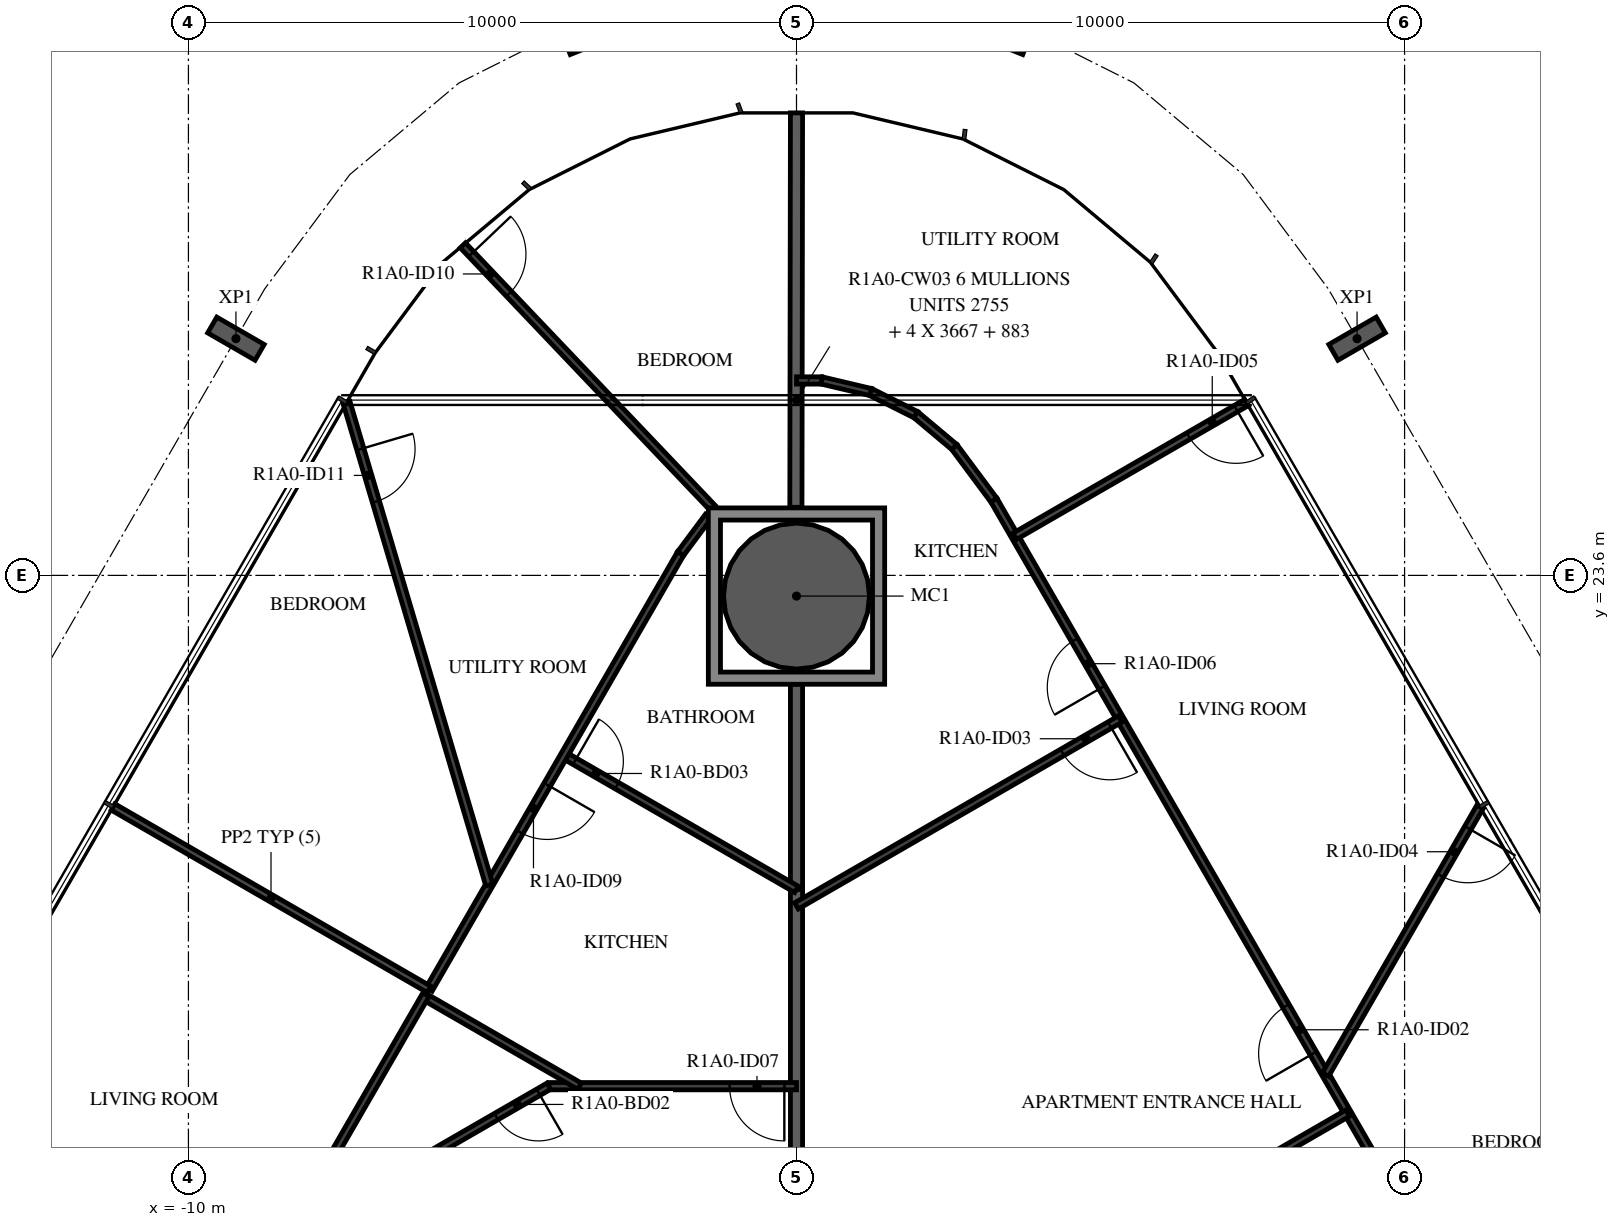
"""IFC4 building model, lengths in metres.
Left out: names, types, materials, properties, quantities, classifications, styles, units other than length and angle.
Written with IfcOpenShell. Run it as: python <this file> out.ifc"""

import sys

from ifc_helpers import new_model, si_unit, direction, frame, frame_2d, origin, origin_2d, place, context, subcontext, project, spatial, polyline, rectangle, hollow_circle, i_section, outline, extrude, element, fill, save


model = new_model("IFC4")
c1 = context("Model", 3, precision=1e-05, world=origin(), true_north=direction((0.0, 1.0)))
c2 = subcontext(c1, "Body", "Model", "MODEL_VIEW")
j1 = project(units=[si_unit("LENGTHUNIT", "METRE"), si_unit("PLANEANGLEUNIT", "RADIAN")], contexts=[c1])
p1 = place(None, origin())
s1 = spatial("IfcSite", under=j1, at=p1, CompositionType="ELEMENT")
p2 = place(p1, origin())
s2 = spatial("IfcBuilding", under=s1, at=p2, CompositionType="ELEMENT")
p3 = place(p2, frame((0.0, 0.0, 38.4)))
s3 = spatial("IfcBuildingStorey", under=s2, at=p3, CompositionType="ELEMENT", Elevation=38.4)
p4 = place(p3, frame((0.0, 23.26, -0.45), z_axis=(0.0, 0.0, 1.0), x_axis=(1.0, 0.0, 0.0)))
e1 = element("IfcColumn", 1, at=p4, inside=s3, PredefinedType="COLUMN", context=c2, shape_type="SweptSolid", body=[
    extrude(hollow_circle(Radius=1.2, WallThickness=0.06, at=origin_2d()), origin(), (0.0, 0.0, 1.0), 3.57),
])
for number, where, z_axis, x_axis in (
    (2, (9.219, 27.493, -0.45), (0.0, 0.0, 1.0), (0.5, -0.866, 0.0)),
    (3, (3.748, 32.639, -0.45), (0.0, 0.0, 1.0), (0.929, -0.371, 0.0)),
    (4, (-3.748, 32.639, -0.45), (0.0, 0.0, 1.0), (0.929, 0.371, 0.0)),
    (5, (-9.219, 27.493, -0.45), (0.0, 0.0, 1.0), (0.5, 0.866, 0.0)),
):
    element("IfcColumn", number, at=place(p3, frame(where, z_axis=z_axis, x_axis=x_axis)), inside=s3, PredefinedType="COLUMN", context=c2, shape_type="SweptSolid", body=[
        extrude(i_section(OverallWidth=0.3, OverallDepth=0.9, WebThickness=0.019, FlangeThickness=0.035, FilletRadius=0.03, at=origin_2d()), origin(), (0.0, 0.0, 1.0), 3.57),
    ])
p5 = place(p3, frame((0.0, 18.437, 0.0), z_axis=(0.0, 0.0, 1.0), x_axis=(0.0, -1.0, 0.0)))
e6 = element("IfcWall", 6, at=p5, inside=s3, PredefinedType="STANDARD", context=c2, shape_type="SweptSolid", body=[
    extrude(rectangle(XDim=4.737, YDim=0.2, at=frame_2d((2.368, 0.0))), origin(), (0.0, 0.0, 1.0), 3.12),
])
p6 = place(p3, frame((0.0, 31.206, 0.0), z_axis=(0.0, 0.0, 1.0), x_axis=(-0.001543266126, -0.999998809164, 0.0)))
e7 = element("IfcWall", 7, at=p6, inside=s3, PredefinedType="STANDARD", context=c2, shape_type="SweptSolid", body=[
    extrude(rectangle(XDim=6.486, YDim=0.2, at=frame_2d((3.243, 0.0))), origin(), (0.0, 0.0, 1.0), 3.12),
])
p7 = place(p3, frame((0.0, 21.81, 0.0), z_axis=(0.0, 0.0, 1.0), x_axis=(0.0, -1.0, 0.0)))
e8 = element("IfcWall", 8, at=p7, inside=s3, PredefinedType="STANDARD", context=c2, shape_type="SweptSolid", body=[
    extrude(rectangle(XDim=3.373, YDim=0.2, at=frame_2d((1.687, 0.0))), origin(), (0.0, 0.0, 1.0), 3.12),
])
p8 = place(p3, frame((11.139, 11.167, 0.0), z_axis=(0.0, 0.0, 1.0), x_axis=(-0.499994660107, 0.866028486751, 0.0)))
e9 = element("IfcWall", 9, at=p8, inside=s3, PredefinedType="PARTITIONING", context=c2, shape_type="SweptSolid", body=[
    extrude(rectangle(XDim=15.786, YDim=0.12, at=frame_2d((7.893, 0.0))), origin(), (0.0, 0.0, 1.0), 3.12),
])
p9 = place(p8, frame((5.279, 0.0, 0.0)))
e10 = element("IfcOpeningElement", 10, at=p9, cuts=e9, PredefinedType="OPENING", context=c2, shape_type="SweptSolid", body=[
    extrude(rectangle(XDim=0.9, YDim=2.1, at=frame_2d((0.45, 1.05))), frame((0.0, 0.07, 0.0), z_axis=(0.0, -1.0, 0.0), x_axis=(1.0, 0.0, 0.0)), (0.0, 0.0, 1.0), 0.14),
])
p10 = place(p8, frame((12.23, 0.0, 0.0)))
e11 = element("IfcOpeningElement", 11, at=p10, cuts=e9, PredefinedType="OPENING", context=c2, shape_type="SweptSolid", body=[
    extrude(rectangle(XDim=0.9, YDim=2.1, at=frame_2d((0.45, 1.05))), frame((0.0, 0.07, 0.0), z_axis=(0.0, -1.0, 0.0), x_axis=(1.0, 0.0, 0.0)), (0.0, 0.0, 1.0), 0.14),
])
p11 = place(p3, frame((6.952, 13.538, 0.0), z_axis=(0.0, 0.0, 1.0), x_axis=(0.866030657337, 0.49999090047, 0.0)))
e12 = element("IfcWall", 12, at=p11, inside=s3, PredefinedType="PARTITIONING", context=c2, shape_type="SweptSolid", body=[
    extrude(rectangle(XDim=2.44, YDim=0.12, at=frame_2d((1.22, 0.0))), origin(), (0.0, 0.0, 1.0), 3.12),
])
p12 = place(p3, frame((5.324, 21.239, 0.0), z_axis=(0.0, 0.0, 1.0), x_axis=(-0.866030172657, -0.49999173998, 0.0)))
e13 = element("IfcWall", 13, at=p12, inside=s3, PredefinedType="PARTITIONING", context=c2, shape_type="SweptSolid", body=[
    extrude(rectangle(XDim=6.147, YDim=0.12, at=frame_2d((3.074, 0.0))), origin(), (0.0, 0.0, 1.0), 3.12),
])
p13 = place(p12, frame((0.2, 0.0, 0.0)))
e14 = element("IfcOpeningElement", 14, at=p13, cuts=e13, PredefinedType="OPENING", context=c2, shape_type="SweptSolid", body=[
    extrude(rectangle(XDim=0.9, YDim=2.1, at=frame_2d((0.45, 1.05))), frame((0.0, 0.07, 0.0), z_axis=(0.0, -1.0, 0.0), x_axis=(1.0, 0.0, 0.0)), (0.0, 0.0, 1.0), 0.14),
])
p14 = place(p3, frame((11.24, 19.792, 0.0), z_axis=(0.0, 0.0, 1.0), x_axis=(-0.499978956711, -0.866037552792, 0.0)))
e15 = element("IfcWall", 15, at=p14, inside=s3, PredefinedType="PARTITIONING", context=c2, shape_type="SweptSolid", body=[
    extrude(rectangle(XDim=5.081, YDim=0.12, at=frame_2d((2.541, 0.0))), origin(), (0.0, 0.0, 1.0), 3.12),
])
p15 = place(p14, frame((0.4, 0.0, 0.0)))
e16 = element("IfcOpeningElement", 16, at=p15, cuts=e15, PredefinedType="OPENING", context=c2, shape_type="SweptSolid", body=[
    extrude(rectangle(XDim=0.9, YDim=2.1, at=frame_2d((0.45, 1.05))), frame((0.0, 0.07, 0.0), z_axis=(0.0, -1.0, 0.0), x_axis=(1.0, 0.0, 0.0)), (0.0, 0.0, 1.0), 0.14),
])
p16 = place(p3, frame((7.4, 26.443, 0.0), z_axis=(0.0, 0.0, 1.0), x_axis=(-0.866032203192, -0.499988222896, 0.0)))
e17 = element("IfcWall", 17, at=p16, inside=s3, PredefinedType="PARTITIONING", context=c2, shape_type="SweptSolid", body=[
    extrude(rectangle(XDim=4.4, YDim=0.12, at=frame_2d((2.2, 0.0))), origin(), (0.0, 0.0, 1.0), 2.73),
])
p17 = place(p16, frame((0.2, 0.0, 0.0)))
e18 = element("IfcOpeningElement", 18, at=p17, cuts=e17, PredefinedType="OPENING", context=c2, shape_type="SweptSolid", body=[
    extrude(rectangle(XDim=0.9, YDim=2.1, at=frame_2d((0.45, 1.05))), frame((0.0, 0.07, 0.0), z_axis=(0.0, -1.0, 0.0), x_axis=(1.0, 0.0, 0.0)), (0.0, 0.0, 1.0), 0.14),
])
p18 = place(p3, frame((0.0, 26.806, 0.0), z_axis=(0.0, 0.0, 1.0), x_axis=(1.0, 0.0, 0.0)))
e19 = element("IfcWall", 19, at=p18, inside=s3, PredefinedType="PARTITIONING", context=c2, shape_type="SweptSolid", body=[
    extrude(rectangle(XDim=0.415, YDim=0.12, at=frame_2d((0.207, 0.0))), origin(), (0.0, 0.0, 1.0), 3.12),
])
p19 = place(p3, frame((0.415, 26.806, 0.0), z_axis=(0.0, 0.0, 1.0), x_axis=(0.973048993259, -0.230598475097, 0.0)))
e20 = element("IfcWall", 20, at=p19, inside=s3, PredefinedType="PARTITIONING", context=c2, shape_type="SweptSolid", body=[
    extrude(rectangle(XDim=0.829, YDim=0.12, at=frame_2d((0.415, 0.0))), origin(), (0.0, 0.0, 1.0), 3.12),
])
for number, where, z_axis, x_axis in (
    (21, (1.221, 26.615, 0.0), (0.0, 0.0, 1.0), (0.894, -0.449, 0.0)),
    (22, (1.962, 26.243, 0.0), (0.0, 0.0, 1.0), (0.766, -0.643, 0.0)),
):
    element("IfcWall", number, at=place(p3, frame(where, z_axis=z_axis, x_axis=x_axis)), inside=s3, PredefinedType="PARTITIONING", context=c2, shape_type="SweptSolid", body=[
        extrude(rectangle(XDim=0.829, YDim=0.12, at=frame_2d((0.415, 0.0))), origin(), (0.0, 0.0, 1.0), 3.12),
    ])
p20 = place(p3, frame((2.597, 25.71, 0.0), z_axis=(0.0, 0.0, 1.0), x_axis=(0.59722925597, -0.802070580319, 0.0)))
e23 = element("IfcWall", 23, at=p20, inside=s3, PredefinedType="PARTITIONING", context=c2, shape_type="SweptSolid", body=[
    extrude(rectangle(XDim=1.087, YDim=0.12, at=frame_2d((0.543, 0.0))), origin(), (0.0, 0.0, 1.0), 3.12),
])
p21 = place(p3, frame((0.0, 15.2, 0.0), z_axis=(0.0, 0.0, 1.0), x_axis=(-1.0, 0.0, 0.0)))
e24 = element("IfcWall", 24, at=p21, inside=s3, PredefinedType="PARTITIONING", context=c2, shape_type="SweptSolid", body=[
    extrude(rectangle(XDim=4.073, YDim=0.12, at=frame_2d((2.036, 0.0))), origin(), (0.0, 0.0, 1.0), 3.12),
])
p22 = place(p21, frame((0.2, 0.0, 0.0)))
e25 = element("IfcOpeningElement", 25, at=p22, cuts=e24, PredefinedType="OPENING", context=c2, shape_type="SweptSolid", body=[
    extrude(rectangle(XDim=0.9, YDim=2.1, at=frame_2d((0.45, 1.05))), frame((0.0, 0.07, 0.0), z_axis=(0.0, -1.0, 0.0), x_axis=(1.0, 0.0, 0.0)), (0.0, 0.0, 1.0), 0.14),
])
p23 = place(p3, frame((-4.073, 15.2, 0.0), z_axis=(0.0, 0.0, 1.0), x_axis=(-0.866024802457, -0.500001041529, 0.0)))
e26 = element("IfcWall", 26, at=p23, inside=s3, PredefinedType="PARTITIONING", context=c2, shape_type="SweptSolid", body=[
    extrude(rectangle(XDim=6.751, YDim=0.12, at=frame_2d((3.376, 0.0))), origin(), (0.0, 0.0, 1.0), 3.12),
])
p24 = place(p23, frame((0.2, 0.0, 0.0)))
e27 = element("IfcOpeningElement", 27, at=p24, cuts=e26, PredefinedType="OPENING", context=c2, shape_type="SweptSolid", body=[
    extrude(rectangle(XDim=0.8, YDim=2.1, at=frame_2d((0.4, 1.05))), frame((0.0, 0.07, 0.0), z_axis=(0.0, -1.0, 0.0), x_axis=(1.0, 0.0, 0.0)), (0.0, 0.0, 1.0), 0.14),
])
p25 = place(p23, frame((5.206, 0.0, 0.0)))
e28 = element("IfcOpeningElement", 28, at=p25, cuts=e26, PredefinedType="OPENING", context=c2, shape_type="SweptSolid", body=[
    extrude(rectangle(XDim=0.9, YDim=2.1, at=frame_2d((0.45, 1.05))), frame((0.0, 0.07, 0.0), z_axis=(0.0, -1.0, 0.0), x_axis=(1.0, 0.0, 0.0)), (0.0, 0.0, 1.0), 0.14),
])
p26 = place(p3, frame((-5.487, 29.028, 0.0), z_axis=(0.0, 0.0, 1.0), x_axis=(0.689189638576, -0.724581011398, 0.0)))
e29 = element("IfcWall", 29, at=p26, inside=s3, PredefinedType="PARTITIONING", context=c2, shape_type="SweptSolid", body=[
    extrude(rectangle(XDim=5.96, YDim=0.12, at=frame_2d((2.98, 0.0))), origin(), (0.0, 0.0, 1.0), 3.12),
])
p27 = place(p26, frame((0.2, 0.0, 0.0)))
e30 = element("IfcOpeningElement", 30, at=p27, cuts=e29, PredefinedType="OPENING", context=c2, shape_type="SweptSolid", body=[
    extrude(rectangle(XDim=0.9, YDim=2.1, at=frame_2d((0.45, 1.05))), frame((0.0, 0.07, 0.0), z_axis=(0.0, -1.0, 0.0), x_axis=(1.0, 0.0, 0.0)), (0.0, 0.0, 1.0), 0.14),
])
p28 = place(p3, frame((-3.821, 20.643, 0.0), z_axis=(0.0, 0.0, 1.0), x_axis=(0.866024310165, -0.5000018942, 0.0)))
e31 = element("IfcWall", 31, at=p28, inside=s3, PredefinedType="PARTITIONING", context=c2, shape_type="SweptSolid", body=[
    extrude(rectangle(XDim=4.412, YDim=0.12, at=frame_2d((2.206, 0.0))), origin(), (0.0, 0.0, 1.0), 3.12),
])
p29 = place(p28, frame((0.2, 0.0, 0.0)))
e32 = element("IfcOpeningElement", 32, at=p29, cuts=e31, PredefinedType="OPENING", context=c2, shape_type="SweptSolid", body=[
    extrude(rectangle(XDim=0.8, YDim=2.1, at=frame_2d((0.4, 1.05))), frame((0.0, 0.07, 0.0), z_axis=(0.0, -1.0, 0.0), x_axis=(1.0, 0.0, 0.0)), (0.0, 0.0, 1.0), 0.14),
])
p30 = place(p3, frame((-1.45, 24.571, 0.0), z_axis=(0.0, 0.0, 1.0), x_axis=(-0.597187509737, -0.802101663266, 0.0)))
e33 = element("IfcWall", 33, at=p30, inside=s3, PredefinedType="PARTITIONING", context=c2, shape_type="SweptSolid", body=[
    extrude(rectangle(XDim=0.765, YDim=0.12, at=frame_2d((0.382, 0.0))), origin(), (0.0, 0.0, 1.0), 3.12),
])
p31 = place(p3, frame((-1.907, 23.957, 0.0), z_axis=(0.0, 0.0, 1.0), x_axis=(-0.499994901178, -0.866028347571, 0.0)))
e34 = element("IfcWall", 34, at=p31, inside=s3, PredefinedType="PARTITIONING", context=c2, shape_type="SweptSolid", body=[
    extrude(rectangle(XDim=8.274, YDim=0.12, at=frame_2d((4.137, 0.0))), origin(), (0.0, 0.0, 1.0), 3.12),
])
p32 = place(p31, frame((4.387, 0.0, 0.0)))
e35 = element("IfcOpeningElement", 35, at=p32, cuts=e34, PredefinedType="OPENING", context=c2, shape_type="SweptSolid", body=[
    extrude(rectangle(XDim=0.9, YDim=2.1, at=frame_2d((0.45, 1.05))), frame((0.0, 0.07, 0.0), z_axis=(0.0, -1.0, 0.0), x_axis=(1.0, 0.0, 0.0)), (0.0, 0.0, 1.0), 0.14),
])
p33 = place(p3, frame((-6.114, 16.67, 0.0), z_axis=(0.0, 0.0, 1.0), x_axis=(0.866011328839, -0.500024377727, 0.0)))
e36 = element("IfcWall", 36, at=p33, inside=s3, PredefinedType="PARTITIONING", context=c2, shape_type="SweptSolid", body=[
    extrude(rectangle(XDim=2.94, YDim=0.12, at=frame_2d((1.47, 0.0))), origin(), (0.0, 0.0, 1.0), 3.12),
])
p34 = place(p3, frame((-7.4, 26.443, 0.0), z_axis=(0.0, 0.0, 1.0), x_axis=(0.283777867447, -0.95889004685, 0.0)))
e37 = element("IfcWall", 37, at=p34, inside=s3, PredefinedType="PARTITIONING", context=c2, shape_type="SweptSolid", body=[
    extrude(rectangle(XDim=8.274, YDim=0.12, at=frame_2d((4.137, 0.0))), origin(), (0.0, 0.0, 1.0), 3.12),
])
p35 = place(p34, frame((0.8, 0.0, 0.0)))
e38 = element("IfcOpeningElement", 38, at=p35, cuts=e37, PredefinedType="OPENING", context=c2, shape_type="SweptSolid", body=[
    extrude(rectangle(XDim=0.9, YDim=2.1, at=frame_2d((0.45, 1.05))), frame((0.0, 0.07, 0.0), z_axis=(0.0, -1.0, 0.0), x_axis=(1.0, 0.0, 0.0)), (0.0, 0.0, 1.0), 0.14),
])
p36 = place(p3, frame((-11.24, 19.792, 0.0), z_axis=(0.0, 0.0, 1.0), x_axis=(0.866031096941, -0.499990139034, 0.0)))
e39 = element("IfcWall", 39, at=p36, inside=s3, PredefinedType="PARTITIONING", context=c2, shape_type="SweptSolid", body=[
    extrude(rectangle(XDim=6.0, YDim=0.12, at=frame_2d((3.0, 0.0))), origin(), (0.0, 0.0, 1.0), 2.73),
])
p37 = place(p3, frame((-6.094, 16.705, 0.0), z_axis=(0.0, 0.0, 1.0), x_axis=(-0.500014747178, -0.86601688933, 0.0)))
e40 = element("IfcWall", 40, at=p37, inside=s3, PredefinedType="PARTITIONING", context=c2, shape_type="SweptSolid", body=[
    extrude(rectangle(XDim=4.627, YDim=0.12, at=frame_2d((2.313, 0.0))), origin(), (0.0, 0.0, 1.0), 3.12),
])
p38 = place(p3, origin())
e41 = element("IfcWall", 41, at=p38, inside=s3, PredefinedType="STANDARD", context=c2, shape_type="SweptSolid", body=[
    extrude(outline(polyline([(1.45, 24.71), (1.45, 21.81), (-1.45, 21.81), (-1.45, 24.71), (1.45, 24.71)]), holes=[polyline([(-1.25, 22.01), (1.25, 22.01), (1.25, 24.51), (-1.25, 24.51), (-1.25, 22.01)])]), origin(), (0.0, 0.0, 1.0), 3.12),
])
p39 = place(p9, origin())
e42 = element("IfcDoor", 42, at=p39, inside=s3, OperationType="SINGLE_SWING_RIGHT", PredefinedType="DOOR", context=c2, shape_type="SweptSolid", body=[
    extrude(rectangle(XDim=0.9, YDim=2.1, at=frame_2d((0.45, 1.05))), frame((0.0, 0.025, 0.0), z_axis=(0.0, -1.0, 0.0), x_axis=(1.0, 0.0, 0.0)), (0.0, 0.0, 1.0), 0.05),
])
fill(e10, e42)
p40 = place(p13, origin())
e43 = element("IfcDoor", 43, at=p40, inside=s3, OperationType="SINGLE_SWING_RIGHT", PredefinedType="DOOR", context=c2, shape_type="SweptSolid", body=[
    extrude(rectangle(XDim=0.9, YDim=2.1, at=frame_2d((0.45, 1.05))), frame((0.0, 0.025, 0.0), z_axis=(0.0, -1.0, 0.0), x_axis=(1.0, 0.0, 0.0)), (0.0, 0.0, 1.0), 0.05),
])
fill(e14, e43)
p41 = place(p15, origin())
e44 = element("IfcDoor", 44, at=p41, inside=s3, OperationType="SINGLE_SWING_LEFT", PredefinedType="DOOR", context=c2, shape_type="SweptSolid", body=[
    extrude(rectangle(XDim=0.9, YDim=2.1, at=frame_2d((0.45, 1.05))), frame((0.0, 0.025, 0.0), z_axis=(0.0, -1.0, 0.0), x_axis=(1.0, 0.0, 0.0)), (0.0, 0.0, 1.0), 0.05),
])
fill(e16, e44)
p42 = place(p17, origin())
e45 = element("IfcDoor", 45, at=p42, inside=s3, OperationType="SINGLE_SWING_RIGHT", PredefinedType="DOOR", context=c2, shape_type="SweptSolid", body=[
    extrude(rectangle(XDim=0.9, YDim=2.1, at=frame_2d((0.45, 1.05))), frame((0.0, 0.025, 0.0), z_axis=(0.0, -1.0, 0.0), x_axis=(1.0, 0.0, 0.0)), (0.0, 0.0, 1.0), 0.05),
])
fill(e18, e45)
p43 = place(p10, origin())
e46 = element("IfcDoor", 46, at=p43, inside=s3, OperationType="SINGLE_SWING_LEFT", PredefinedType="DOOR", context=c2, shape_type="SweptSolid", body=[
    extrude(rectangle(XDim=0.9, YDim=2.1, at=frame_2d((0.45, 1.05))), frame((0.0, 0.025, 0.0), z_axis=(0.0, -1.0, 0.0), x_axis=(1.0, 0.0, 0.0)), (0.0, 0.0, 1.0), 0.05),
])
fill(e11, e46)
p44 = place(p22, origin())
e47 = element("IfcDoor", 47, at=p44, inside=s3, OperationType="SINGLE_SWING_RIGHT", PredefinedType="DOOR", context=c2, shape_type="SweptSolid", body=[
    extrude(rectangle(XDim=0.9, YDim=2.1, at=frame_2d((0.45, 1.05))), frame((0.0, 0.025, 0.0), z_axis=(0.0, -1.0, 0.0), x_axis=(1.0, 0.0, 0.0)), (0.0, 0.0, 1.0), 0.05),
])
fill(e25, e47)
p45 = place(p24, origin())
e48 = element("IfcDoor", 48, at=p45, inside=s3, OperationType="SINGLE_SWING_LEFT", PredefinedType="DOOR", context=c2, shape_type="SweptSolid", body=[
    extrude(rectangle(XDim=0.8, YDim=2.1, at=frame_2d((0.4, 1.05))), frame((0.0, 0.025, 0.0), z_axis=(0.0, -1.0, 0.0), x_axis=(1.0, 0.0, 0.0)), (0.0, 0.0, 1.0), 0.05),
])
fill(e27, e48)
p46 = place(p29, origin())
e49 = element("IfcDoor", 49, at=p46, inside=s3, OperationType="SINGLE_SWING_LEFT", PredefinedType="DOOR", context=c2, shape_type="SweptSolid", body=[
    extrude(rectangle(XDim=0.8, YDim=2.1, at=frame_2d((0.4, 1.05))), frame((0.0, 0.025, 0.0), z_axis=(0.0, -1.0, 0.0), x_axis=(1.0, 0.0, 0.0)), (0.0, 0.0, 1.0), 0.05),
])
fill(e32, e49)
p47 = place(p32, origin())
e50 = element("IfcDoor", 50, at=p47, inside=s3, OperationType="SINGLE_SWING_LEFT", PredefinedType="DOOR", context=c2, shape_type="SweptSolid", body=[
    extrude(rectangle(XDim=0.9, YDim=2.1, at=frame_2d((0.45, 1.05))), frame((0.0, 0.025, 0.0), z_axis=(0.0, -1.0, 0.0), x_axis=(1.0, 0.0, 0.0)), (0.0, 0.0, 1.0), 0.05),
])
fill(e35, e50)
p48 = place(p27, origin())
e51 = element("IfcDoor", 51, at=p48, inside=s3, OperationType="SINGLE_SWING_LEFT", PredefinedType="DOOR", context=c2, shape_type="SweptSolid", body=[
    extrude(rectangle(XDim=0.9, YDim=2.1, at=frame_2d((0.45, 1.05))), frame((0.0, 0.025, 0.0), z_axis=(0.0, -1.0, 0.0), x_axis=(1.0, 0.0, 0.0)), (0.0, 0.0, 1.0), 0.05),
])
fill(e30, e51)
p49 = place(p35, origin())
e52 = element("IfcDoor", 52, at=p49, inside=s3, OperationType="SINGLE_SWING_RIGHT", PredefinedType="DOOR", context=c2, shape_type="SweptSolid", body=[
    extrude(rectangle(XDim=0.9, YDim=2.1, at=frame_2d((0.45, 1.05))), frame((0.0, 0.025, 0.0), z_axis=(0.0, -1.0, 0.0), x_axis=(1.0, 0.0, 0.0)), (0.0, 0.0, 1.0), 0.05),
])
fill(e38, e52)
save(model, sys.argv[1])
